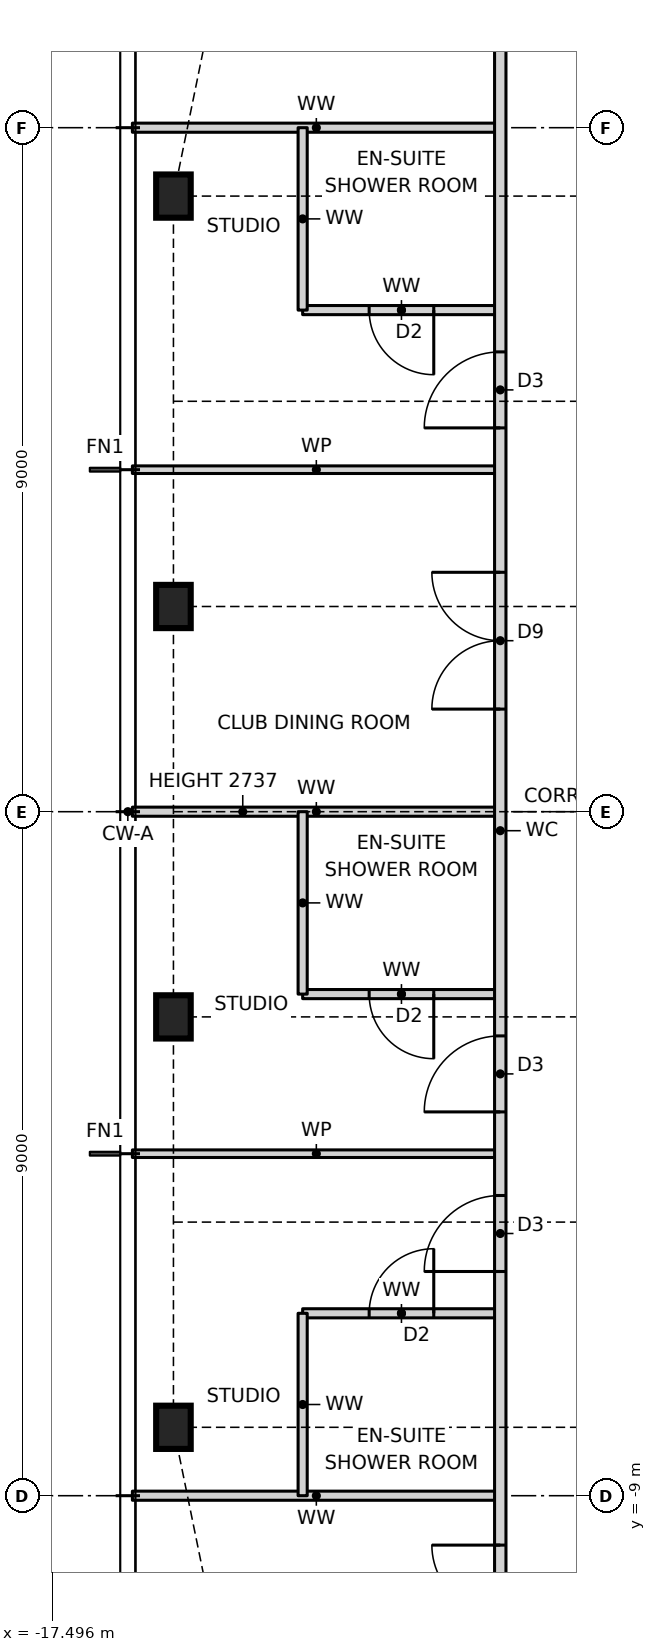
"""IFC4 building model, lengths in metres.
Left out: names, types, materials, properties, quantities, classifications, styles, units other than length and angle.
Written with IfcOpenShell. Run it as: python <this file> out.ifc"""

import sys

from ifc_helpers import new_model, si_unit, direction, frame, frame_2d, origin, origin_2d, place, context, subcontext, project, spatial, rectangle, i_section, extrude, element, fill, save


model = new_model("IFC4")
c1 = context("Model", 3, precision=1e-05, world=origin(), true_north=direction((0.0, 1.0)))
c2 = subcontext(c1, "Body", "Model", "MODEL_VIEW")
j1 = project(units=[si_unit("LENGTHUNIT", "METRE"), si_unit("PLANEANGLEUNIT", "RADIAN")], contexts=[c1])
p1 = place(None, origin())
s1 = spatial("IfcSite", under=j1, at=p1, CompositionType="ELEMENT")
p2 = place(p1, origin())
s2 = spatial("IfcBuilding", under=s1, at=p2, CompositionType="ELEMENT")
p3 = place(p2, frame((0.0, 0.0, 260.5)))
s3 = spatial("IfcBuildingStorey", under=s2, at=p3, CompositionType="ELEMENT", Elevation=260.5)
for number, where, z_axis, x_axis in (
    (1, (-15.9, 8.1, 0.0), (0.0, 0.0, 1.0), (1.0, 0.0, 0.0)),
    (2, (-15.9, 2.7, 0.0), (0.0, 0.0, 1.0), (1.0, 0.0, 0.0)),
    (3, (-15.9, -2.7, 0.0), (0.0, 0.0, 1.0), (1.0, 0.0, 0.0)),
    (4, (-15.9, -8.1, 0.0), (0.0, 0.0, 1.0), (1.0, 0.0, 0.0)),
):
    element("IfcColumn", number, at=place(p3, frame(where, z_axis=z_axis, x_axis=x_axis)), inside=s3, PredefinedType="COLUMN", context=c2, shape_type="SweptSolid", body=[
        extrude(i_section(OverallWidth=0.455, OverallDepth=0.569, WebThickness=0.078, FlangeThickness=0.125, at=origin_2d()), origin(), (0.0, 0.0, 1.0), 3.5),
    ])
p4 = place(p3, frame((-16.44, -9.0, 0.0), z_axis=(0.0, 0.0, 1.0), x_axis=(1.0, 0.0, 0.0)))
e5 = element("IfcWall", 5, at=p4, inside=s3, PredefinedType="PARTITIONING", context=c2, shape_type="SweptSolid", body=[
    extrude(rectangle(XDim=4.84, YDim=0.12, at=frame_2d((2.42, 0.0))), origin(), (0.0, 0.0, 1.0), 3.27),
])
p5 = place(p3, frame((-14.2, -6.6, 0.0), z_axis=(0.0, 0.0, 1.0), x_axis=(1.0, 0.0, 0.0)))
e6 = element("IfcWall", 6, at=p5, inside=s3, PredefinedType="PARTITIONING", context=c2, shape_type="SweptSolid", body=[
    extrude(rectangle(XDim=2.6, YDim=0.12, at=frame_2d((1.3, 0.0))), origin(), (0.0, 0.0, 1.0), 3.27),
])
p6 = place(p5, frame((0.875, 0.0, 0.0)))
e7 = element("IfcOpeningElement", 7, at=p6, cuts=e6, PredefinedType="OPENING", context=c2, shape_type="SweptSolid", body=[
    extrude(rectangle(XDim=0.85, YDim=2.1, at=frame_2d((0.425, 1.05))), frame((0.0, 0.07, 0.0), z_axis=(0.0, -1.0, 0.0), x_axis=(1.0, 0.0, 0.0)), (0.0, 0.0, 1.0), 0.14),
])
p7 = place(p3, frame((-16.44, -4.5, 0.0), z_axis=(0.0, 0.0, 1.0), x_axis=(1.0, 0.0, 0.0)))
e8 = element("IfcWall", 8, at=p7, inside=s3, PredefinedType="PARTITIONING", context=c2, shape_type="SweptSolid", body=[
    extrude(rectangle(XDim=4.84, YDim=0.1, at=frame_2d((2.42, 0.0))), origin(), (0.0, 0.0, 1.0), 3.27),
])
p8 = place(p3, frame((-14.2, -2.4, 0.0), z_axis=(0.0, 0.0, 1.0), x_axis=(1.0, 0.0, 0.0)))
e9 = element("IfcWall", 9, at=p8, inside=s3, PredefinedType="PARTITIONING", context=c2, shape_type="SweptSolid", body=[
    extrude(rectangle(XDim=2.6, YDim=0.12, at=frame_2d((1.3, 0.0))), origin(), (0.0, 0.0, 1.0), 3.27),
])
p9 = place(p8, frame((0.875, 0.0, 0.0)))
e10 = element("IfcOpeningElement", 10, at=p9, cuts=e9, PredefinedType="OPENING", context=c2, shape_type="SweptSolid", body=[
    extrude(rectangle(XDim=0.85, YDim=2.1, at=frame_2d((0.425, 1.05))), frame((0.0, 0.07, 0.0), z_axis=(0.0, -1.0, 0.0), x_axis=(1.0, 0.0, 0.0)), (0.0, 0.0, 1.0), 0.14),
])
p10 = place(p3, frame((-16.44, 0.0, 0.0), z_axis=(0.0, 0.0, 1.0), x_axis=(1.0, 0.0, 0.0)))
e11 = element("IfcWall", 11, at=p10, inside=s3, PredefinedType="PARTITIONING", context=c2, shape_type="SweptSolid", body=[
    extrude(rectangle(XDim=4.84, YDim=0.12, at=frame_2d((2.42, 0.0))), origin(), (0.0, 0.0, 1.0), 2.737),
])
p11 = place(p3, frame((-16.44, 4.5, 0.0), z_axis=(0.0, 0.0, 1.0), x_axis=(1.0, 0.0, 0.0)))
e12 = element("IfcWall", 12, at=p11, inside=s3, PredefinedType="PARTITIONING", context=c2, shape_type="SweptSolid", body=[
    extrude(rectangle(XDim=4.84, YDim=0.1, at=frame_2d((2.42, 0.0))), origin(), (0.0, 0.0, 1.0), 3.27),
])
p12 = place(p3, frame((-14.2, 6.6, 0.0), z_axis=(0.0, 0.0, 1.0), x_axis=(1.0, 0.0, 0.0)))
e13 = element("IfcWall", 13, at=p12, inside=s3, PredefinedType="PARTITIONING", context=c2, shape_type="SweptSolid", body=[
    extrude(rectangle(XDim=2.6, YDim=0.12, at=frame_2d((1.3, 0.0))), origin(), (0.0, 0.0, 1.0), 3.27),
])
p13 = place(p12, frame((0.875, 0.0, 0.0)))
e14 = element("IfcOpeningElement", 14, at=p13, cuts=e13, PredefinedType="OPENING", context=c2, shape_type="SweptSolid", body=[
    extrude(rectangle(XDim=0.85, YDim=2.1, at=frame_2d((0.425, 1.05))), frame((0.0, 0.07, 0.0), z_axis=(0.0, -1.0, 0.0), x_axis=(1.0, 0.0, 0.0)), (0.0, 0.0, 1.0), 0.14),
])
p14 = place(p3, frame((-16.44, 9.0, 0.0), z_axis=(0.0, 0.0, 1.0), x_axis=(1.0, 0.0, 0.0)))
e15 = element("IfcWall", 15, at=p14, inside=s3, PredefinedType="PARTITIONING", context=c2, shape_type="SweptSolid", body=[
    extrude(rectangle(XDim=4.84, YDim=0.12, at=frame_2d((2.42, 0.0))), origin(), (0.0, 0.0, 1.0), 3.27),
])
p15 = place(p3, frame((-11.6, -12.1, 0.0), z_axis=(0.0, 0.0, 1.0), x_axis=(0.0, 1.0, 0.0)))
e16 = element("IfcWall", 16, at=p15, inside=s3, PredefinedType="PARTITIONING", context=c2, shape_type="SweptSolid", body=[
    extrude(rectangle(XDim=23.7, YDim=0.15, at=frame_2d((11.85, 0.0))), origin(), (0.0, 0.0, 1.0), 3.27),
])
p16 = place(p15, frame((17.15, 0.0, 0.0)))
e17 = element("IfcOpeningElement", 17, at=p16, cuts=e16, PredefinedType="OPENING", context=c2, shape_type="SweptSolid", body=[
    extrude(rectangle(XDim=1.0, YDim=2.1, at=frame_2d((0.5, 1.05))), frame((0.0, 0.085, 0.0), z_axis=(0.0, -1.0, 0.0), x_axis=(1.0, 0.0, 0.0)), (0.0, 0.0, 1.0), 0.17),
])
p17 = place(p15, frame((13.45, 0.0, 0.0)))
e18 = element("IfcOpeningElement", 18, at=p17, cuts=e16, PredefinedType="OPENING", context=c2, shape_type="SweptSolid", body=[
    extrude(rectangle(XDim=1.8, YDim=2.1, at=frame_2d((0.9, 1.05))), frame((0.0, 0.085, 0.0), z_axis=(0.0, -1.0, 0.0), x_axis=(1.0, 0.0, 0.0)), (0.0, 0.0, 1.0), 0.17),
])
p18 = place(p15, frame((8.15, 0.0, 0.0)))
e19 = element("IfcOpeningElement", 19, at=p18, cuts=e16, PredefinedType="OPENING", context=c2, shape_type="SweptSolid", body=[
    extrude(rectangle(XDim=1.0, YDim=2.1, at=frame_2d((0.5, 1.05))), frame((0.0, 0.085, 0.0), z_axis=(0.0, -1.0, 0.0), x_axis=(1.0, 0.0, 0.0)), (0.0, 0.0, 1.0), 0.17),
])
p19 = place(p15, frame((6.05, 0.0, 0.0)))
e20 = element("IfcOpeningElement", 20, at=p19, cuts=e16, PredefinedType="OPENING", context=c2, shape_type="SweptSolid", body=[
    extrude(rectangle(XDim=1.0, YDim=2.1, at=frame_2d((0.5, 1.05))), frame((0.0, 0.085, 0.0), z_axis=(0.0, -1.0, 0.0), x_axis=(1.0, 0.0, 0.0)), (0.0, 0.0, 1.0), 0.17),
])
p20 = place(p15, frame((0.65, 0.0, 0.0)))
e21 = element("IfcOpeningElement", 21, at=p20, cuts=e16, PredefinedType="OPENING", context=c2, shape_type="SweptSolid", body=[
    extrude(rectangle(XDim=1.8, YDim=2.1, at=frame_2d((0.9, 1.05))), frame((0.0, 0.085, 0.0), z_axis=(0.0, -1.0, 0.0), x_axis=(1.0, 0.0, 0.0)), (0.0, 0.0, 1.0), 0.17),
])
for number, where, z_axis, x_axis in (
    (22, (-14.2, -9.0, 0.0), (0.0, 0.0, 1.0), (0.0, 1.0, 0.0)),
    (23, (-14.2, -2.4, 0.0), (0.0, 0.0, 1.0), (0.0, 1.0, 0.0)),
    (24, (-14.2, 6.6, 0.0), (0.0, 0.0, 1.0), (0.0, 1.0, 0.0)),
):
    element("IfcWall", number, at=place(p3, frame(where, z_axis=z_axis, x_axis=x_axis)), inside=s3, PredefinedType="PARTITIONING", context=c2, shape_type="SweptSolid", body=[
        extrude(rectangle(XDim=2.4, YDim=0.12, at=frame_2d((1.2, 0.0))), origin(), (0.0, 0.0, 1.0), 3.27),
    ])
p21 = place(p16, origin())
e25 = element("IfcDoor", 25, at=p21, inside=s3, OperationType="SINGLE_SWING_LEFT", PredefinedType="DOOR", context=c2, shape_type="SweptSolid", body=[
    extrude(rectangle(XDim=1.0, YDim=2.1, at=frame_2d((0.5, 1.05))), frame((0.0, 0.025, 0.0), z_axis=(0.0, -1.0, 0.0), x_axis=(1.0, 0.0, 0.0)), (0.0, 0.0, 1.0), 0.05),
])
fill(e17, e25)
p22 = place(p13, frame((0.85, 0.0, 0.0), z_axis=(0.0, 0.0, 1.0), x_axis=(-1.0, 0.0, 0.0)))
e26 = element("IfcDoor", 26, at=p22, inside=s3, OperationType="SINGLE_SWING_LEFT", PredefinedType="DOOR", context=c2, shape_type="SweptSolid", body=[
    extrude(rectangle(XDim=0.85, YDim=2.1, at=frame_2d((0.425, 1.05))), frame((0.0, 0.025, 0.0), z_axis=(0.0, -1.0, 0.0), x_axis=(1.0, 0.0, 0.0)), (0.0, 0.0, 1.0), 0.05),
])
fill(e14, e26)
p23 = place(p17, origin())
e27 = element("IfcDoor", 27, at=p23, inside=s3, OperationType="DOUBLE_DOOR_SINGLE_SWING", PredefinedType="DOOR", context=c2, shape_type="SweptSolid", body=[
    extrude(rectangle(XDim=1.8, YDim=2.1, at=frame_2d((0.9, 1.05))), frame((0.0, 0.025, 0.0), z_axis=(0.0, -1.0, 0.0), x_axis=(1.0, 0.0, 0.0)), (0.0, 0.0, 1.0), 0.05),
])
fill(e18, e27)
p24 = place(p18, origin())
e28 = element("IfcDoor", 28, at=p24, inside=s3, OperationType="SINGLE_SWING_LEFT", PredefinedType="DOOR", context=c2, shape_type="SweptSolid", body=[
    extrude(rectangle(XDim=1.0, YDim=2.1, at=frame_2d((0.5, 1.05))), frame((0.0, 0.025, 0.0), z_axis=(0.0, -1.0, 0.0), x_axis=(1.0, 0.0, 0.0)), (0.0, 0.0, 1.0), 0.05),
])
fill(e19, e28)
p25 = place(p9, frame((0.85, 0.0, 0.0), z_axis=(0.0, 0.0, 1.0), x_axis=(-1.0, 0.0, 0.0)))
e29 = element("IfcDoor", 29, at=p25, inside=s3, OperationType="SINGLE_SWING_LEFT", PredefinedType="DOOR", context=c2, shape_type="SweptSolid", body=[
    extrude(rectangle(XDim=0.85, YDim=2.1, at=frame_2d((0.425, 1.05))), frame((0.0, 0.025, 0.0), z_axis=(0.0, -1.0, 0.0), x_axis=(1.0, 0.0, 0.0)), (0.0, 0.0, 1.0), 0.05),
])
fill(e10, e29)
p26 = place(p19, origin())
e30 = element("IfcDoor", 30, at=p26, inside=s3, OperationType="SINGLE_SWING_LEFT", PredefinedType="DOOR", context=c2, shape_type="SweptSolid", body=[
    extrude(rectangle(XDim=1.0, YDim=2.1, at=frame_2d((0.5, 1.05))), frame((0.0, 0.025, 0.0), z_axis=(0.0, -1.0, 0.0), x_axis=(1.0, 0.0, 0.0)), (0.0, 0.0, 1.0), 0.05),
])
fill(e20, e30)
p27 = place(p6, origin())
e31 = element("IfcDoor", 31, at=p27, inside=s3, OperationType="SINGLE_SWING_RIGHT", PredefinedType="DOOR", context=c2, shape_type="SweptSolid", body=[
    extrude(rectangle(XDim=0.85, YDim=2.1, at=frame_2d((0.425, 1.05))), frame((0.0, 0.025, 0.0), z_axis=(0.0, -1.0, 0.0), x_axis=(1.0, 0.0, 0.0)), (0.0, 0.0, 1.0), 0.05),
])
fill(e7, e31)
p28 = place(p20, origin())
e32 = element("IfcDoor", 32, at=p28, inside=s3, OperationType="DOUBLE_DOOR_SINGLE_SWING", PredefinedType="DOOR", context=c2, shape_type="SweptSolid", body=[
    extrude(rectangle(XDim=1.8, YDim=2.1, at=frame_2d((0.9, 1.05))), frame((0.0, 0.025, 0.0), z_axis=(0.0, -1.0, 0.0), x_axis=(1.0, 0.0, 0.0)), (0.0, 0.0, 1.0), 0.05),
])
fill(e21, e32)
save(model, sys.argv[1])
